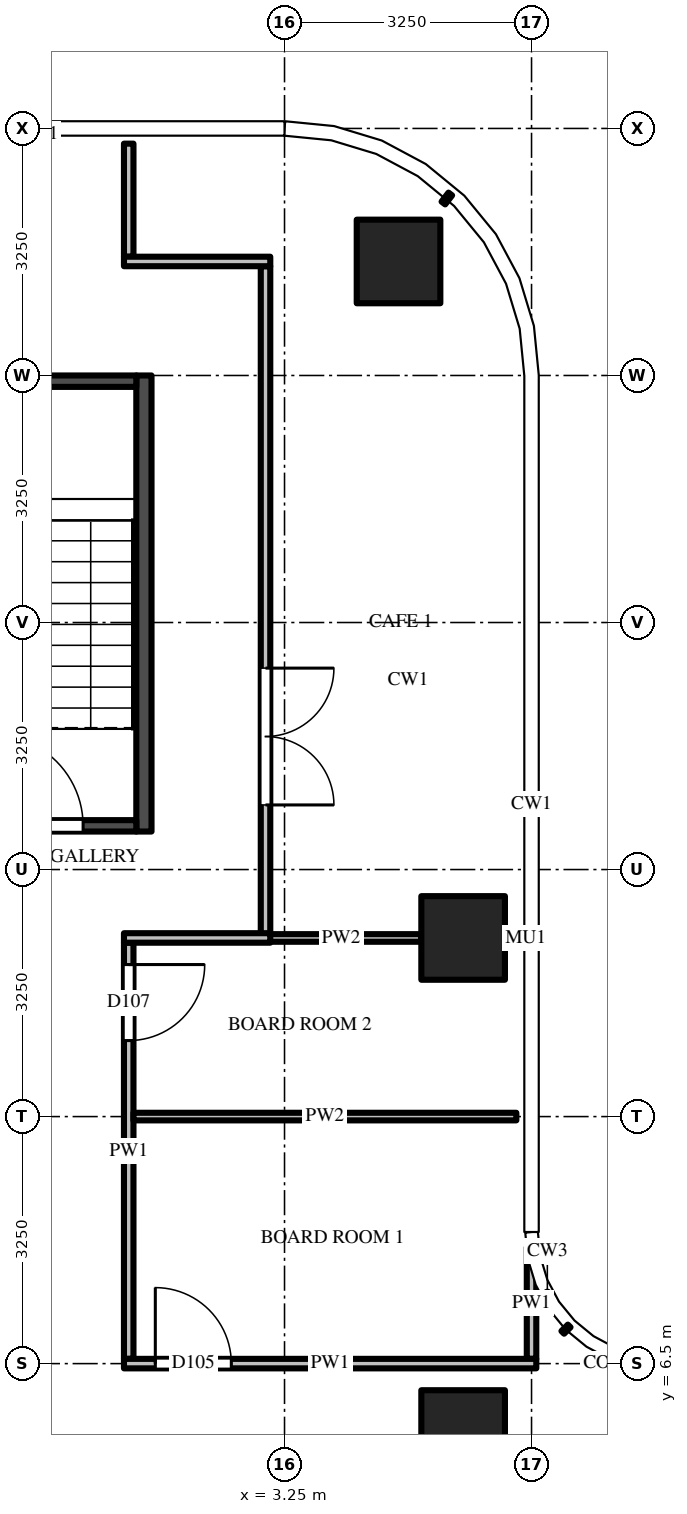
"""IFC4 building model, lengths in metres.
Left out: names, types, materials, properties, quantities, classifications, styles, units other than length and angle.
Written with IfcOpenShell. Run it as: python <this file> out.ifc"""

import sys

from ifc_helpers import new_model, si_unit, direction, frame, frame_2d, origin, origin_2d, place, context, subcontext, project, spatial, rectangle, extrude, source, transform, mapped, element, fill, save


model = new_model("IFC4")
c1 = context("Model", 3, precision=1e-05, world=origin(), true_north=direction((0.0, 1.0)))
c2 = subcontext(c1, "Body", "Model", "MODEL_VIEW")
j1 = project(units=[si_unit("LENGTHUNIT", "METRE"), si_unit("PLANEANGLEUNIT", "RADIAN")], contexts=[c1])
p1 = place(None, origin())
s1 = spatial("IfcSite", under=j1, at=p1, CompositionType="ELEMENT")
p2 = place(p1, origin())
s2 = spatial("IfcBuilding", under=s1, at=p2, CompositionType="ELEMENT")
p3 = place(p2, frame((0.0, 0.0, 248.0)))
s3 = spatial("IfcBuildingStorey", under=s2, at=p3, CompositionType="ELEMENT", Elevation=248.0)
m1 = source(origin(), c2, "Body", "SweptSolid", [
    extrude(rectangle(XDim=1.1, YDim=1.1, at=origin_2d()), origin(), (0.0, 0.0, 1.0), 3.9),
])
for number, where, z_axis, x_axis in (
    (1, (5.6, 12.1, 0.0), (0.0, 0.0, 1.0), (1.0, 0.0, 0.0)),
    (2, (4.75, 21.0, 0.0), (0.0, 0.0, 1.0), (1.0, 0.0, 0.0)),
    (3, (5.6, 5.6, 0.0), (0.0, 0.0, 1.0), (1.0, 0.0, 0.0)),
):
    element("IfcColumn", number, at=place(p3, frame(where, z_axis=z_axis, x_axis=x_axis)), inside=s3, PredefinedType="COLUMN", context=c2, shape_type="MappedRepresentation", body=[
        mapped(m1, transform((0.0, 0.0, 0.0))),
    ])
m2 = source(origin(), c2, "Body", "SweptSolid", [
    extrude(rectangle(XDim=6.0, YDim=0.2, at=frame_2d((3.0, 0.0))), origin(), (0.0, 0.0, 1.0), 3.7),
])
p4 = place(p3, frame((1.4, 13.5, 0.0), z_axis=(0.0, 0.0, 1.0), x_axis=(0.0, 1.0, 0.0)))
e4 = element("IfcWall", 4, at=p4, inside=s3, PredefinedType="SHEAR", context=c2, shape_type="MappedRepresentation", body=[
    mapped(m2, transform((0.0, 0.0, 0.0))),
])
m3 = source(origin(), c2, "Body", "SweptSolid", [
    extrude(rectangle(XDim=2.6, YDim=0.15, at=frame_2d((1.3, 0.0))), origin(), (0.0, 0.0, 1.0), 3.7),
])
p5 = place(p3, frame((-1.3, 13.575, 0.0), z_axis=(0.0, 0.0, 1.0), x_axis=(1.0, 0.0, 0.0)))
e5 = element("IfcWall", 5, at=p5, inside=s3, PredefinedType="SHEAR", context=c2, shape_type="MappedRepresentation", body=[
    mapped(m3, transform((0.0, 0.0, 0.0))),
])
m4 = source(origin(), c2, "Body", "SweptSolid", [
    extrude(rectangle(XDim=1.2, YDim=2.1, at=frame_2d((0.6, 1.05))), frame((0.0, 0.085, 0.0), z_axis=(0.0, -1.0, 0.0), x_axis=(1.0, 0.0, 0.0)), (0.0, 0.0, 1.0), 0.17),
])
p6 = place(p5, frame((0.7, 0.0, 0.0)))
e6 = element("IfcOpeningElement", 6, at=p6, cuts=e5, PredefinedType="OPENING", context=c2, shape_type="MappedRepresentation", body=[
    mapped(m4, transform((0.0, 0.0, 0.0))),
])
p7 = place(p3, frame((-1.3, 19.425, 0.0), z_axis=(0.0, 0.0, 1.0), x_axis=(1.0, 0.0, 0.0)))
e7 = element("IfcWall", 7, at=p7, inside=s3, PredefinedType="SHEAR", context=c2, shape_type="MappedRepresentation", body=[
    mapped(m3, transform((0.0, 0.0, 0.0))),
])
m5 = source(origin(), c2, "Body", "SweptSolid", [
    extrude(rectangle(XDim=5.475, YDim=0.125, at=frame_2d((2.738, 0.0))), origin(), (0.0, 0.0, 1.0), 2.997),
])
p8 = place(p3, frame((1.2, 12.038, 0.0), z_axis=(0.0, 0.0, 1.0), x_axis=(0.0, -1.0, 0.0)))
e8 = element("IfcWall", 8, at=p8, inside=s3, PredefinedType="PARTITIONING", context=c2, shape_type="MappedRepresentation", body=[
    mapped(m5, transform((0.0, 0.0, 0.0))),
])
m6 = source(origin(), c2, "Body", "SweptSolid", [
    extrude(rectangle(XDim=1.0, YDim=2.1, at=frame_2d((0.5, 1.05))), frame((0.0, 0.073, 0.0), z_axis=(0.0, -1.0, 0.0), x_axis=(1.0, 0.0, 0.0)), (0.0, 0.0, 1.0), 0.145),
])
p9 = place(p8, frame((0.288, 0.0, 0.0)))
e9 = element("IfcOpeningElement", 9, at=p9, cuts=e8, PredefinedType="OPENING", context=c2, shape_type="MappedRepresentation", body=[
    mapped(m6, transform((0.0, 0.0, 0.0))),
])
m7 = source(origin(), c2, "Body", "SweptSolid", [
    extrude(rectangle(XDim=1.488, YDim=0.125, at=frame_2d((0.744, 0.0))), origin(), (0.0, 0.0, 1.0), 2.78),
])
p10 = place(p3, frame((1.2, 22.55, 0.0), z_axis=(0.0, 0.0, 1.0), x_axis=(0.0, -1.0, 0.0)))
e10 = element("IfcWall", 10, at=p10, inside=s3, PredefinedType="PARTITIONING", context=c2, shape_type="MappedRepresentation", body=[
    mapped(m7, transform((0.0, 0.0, 0.0))),
])
m8 = source(origin(), c2, "Body", "SweptSolid", [
    extrude(rectangle(XDim=8.788, YDim=0.125, at=frame_2d((4.394, 0.0))), origin(), (0.0, 0.0, 1.0), 2.78),
])
p11 = place(p3, frame((3.0, 20.938, 0.0), z_axis=(0.0, 0.0, 1.0), x_axis=(0.0, -1.0, 0.0)))
e11 = element("IfcWall", 11, at=p11, inside=s3, PredefinedType="PARTITIONING", context=c2, shape_type="MappedRepresentation", body=[
    mapped(m8, transform((0.0, 0.0, 0.0))),
])
m9 = source(origin(), c2, "Body", "SweptSolid", [
    extrude(rectangle(XDim=1.8, YDim=2.1, at=frame_2d((0.9, 1.05))), frame((0.0, 0.073, 0.0), z_axis=(0.0, -1.0, 0.0), x_axis=(1.0, 0.0, 0.0)), (0.0, 0.0, 1.0), 0.145),
])
p12 = place(p11, frame((5.288, 0.0, 0.0)))
e12 = element("IfcOpeningElement", 12, at=p12, cuts=e11, PredefinedType="OPENING", context=c2, shape_type="MappedRepresentation", body=[
    mapped(m9, transform((0.0, 0.0, 0.0))),
])
m10 = source(origin(), c2, "Body", "SweptSolid", [
    extrude(rectangle(XDim=1.469, YDim=0.125, at=frame_2d((0.734, 0.0))), origin(), (0.0, 0.0, 1.0), 3.7),
])
p13 = place(p3, frame((6.5, 6.562, 0.0), z_axis=(0.0, 0.0, 1.0), x_axis=(0.0, 1.0, 0.0)))
e13 = element("IfcWall", 13, at=p13, inside=s3, PredefinedType="PARTITIONING", context=c2, shape_type="MappedRepresentation", body=[
    mapped(m10, transform((0.0, 0.0, 0.0))),
])
m11 = source(origin(), c2, "Body", "SweptSolid", [
    extrude(rectangle(XDim=5.425, YDim=0.125, at=frame_2d((2.712, 0.0))), origin(), (0.0, 0.0, 1.0), 2.78),
])
p14 = place(p3, frame((1.137, 6.5, 0.0), z_axis=(0.0, 0.0, 1.0), x_axis=(1.0, 0.0, 0.0)))
e14 = element("IfcWall", 14, at=p14, inside=s3, PredefinedType="PARTITIONING", context=c2, shape_type="MappedRepresentation", body=[
    mapped(m11, transform((0.0, 0.0, 0.0))),
])
p15 = place(p14, frame((0.413, 0.0, 0.0)))
e15 = element("IfcOpeningElement", 15, at=p15, cuts=e14, PredefinedType="OPENING", context=c2, shape_type="MappedRepresentation", body=[
    mapped(m6, transform((0.0, 0.0, 0.0))),
])
m12 = source(origin(), c2, "Body", "SweptSolid", [
    extrude(rectangle(XDim=5.038, YDim=0.1, at=frame_2d((2.519, 0.0))), origin(), (0.0, 0.0, 1.0), 2.78),
])
p16 = place(p3, frame((1.262, 9.75, 0.0), z_axis=(0.0, 0.0, 1.0), x_axis=(1.0, 0.0, 0.0)))
e16 = element("IfcWall", 16, at=p16, inside=s3, PredefinedType="PARTITIONING", context=c2, shape_type="MappedRepresentation", body=[
    mapped(m12, transform((0.0, 0.0, 0.0))),
])
m13 = source(origin(), c2, "Body", "SweptSolid", [
    extrude(rectangle(XDim=2.113, YDim=0.1, at=frame_2d((1.056, 0.0))), origin(), (0.0, 0.0, 1.0), 2.997),
])
p17 = place(p3, frame((2.938, 12.1, 0.0), z_axis=(0.0, 0.0, 1.0), x_axis=(1.0, 0.0, 0.0)))
e17 = element("IfcWall", 17, at=p17, inside=s3, PredefinedType="PARTITIONING", context=c2, shape_type="MappedRepresentation", body=[
    mapped(m13, transform((0.0, 0.0, 0.0))),
])
m14 = source(origin(), c2, "Body", "SweptSolid", [
    extrude(rectangle(XDim=1.925, YDim=0.125, at=frame_2d((0.962, 0.0))), origin(), (0.0, 0.0, 1.0), 2.997),
])
p18 = place(p3, frame((3.062, 12.1, 0.0), z_axis=(0.0, 0.0, 1.0), x_axis=(-1.0, 0.0, 0.0)))
e18 = element("IfcWall", 18, at=p18, inside=s3, PredefinedType="PARTITIONING", context=c2, shape_type="MappedRepresentation", body=[
    mapped(m14, transform((0.0, 0.0, 0.0))),
])
m15 = source(origin(), c2, "Body", "SweptSolid", [
    extrude(rectangle(XDim=1.925, YDim=0.125, at=frame_2d((0.962, 0.0))), origin(), (0.0, 0.0, 1.0), 2.78),
])
p19 = place(p3, frame((1.137, 21.0, 0.0), z_axis=(0.0, 0.0, 1.0), x_axis=(1.0, 0.0, 0.0)))
e19 = element("IfcWall", 19, at=p19, inside=s3, PredefinedType="PARTITIONING", context=c2, shape_type="MappedRepresentation", body=[
    mapped(m15, transform((0.0, 0.0, 0.0))),
])
m16 = source(origin(), c2, "Body", "SweptSolid", [
    extrude(rectangle(XDim=1.2, YDim=2.1, at=frame_2d((0.6, 1.05))), frame((0.0, 0.025, 0.0), z_axis=(0.0, -1.0, 0.0), x_axis=(1.0, 0.0, 0.0)), (0.0, 0.0, 1.0), 0.05),
])
p20 = place(p6, origin())
e20 = element("IfcDoor", 20, at=p20, inside=s3, OperationType="SINGLE_SWING_LEFT", PredefinedType="DOOR", context=c2, shape_type="MappedRepresentation", body=[
    mapped(m16, transform((0.0, 0.0, 0.0))),
])
fill(e6, e20)
m17 = source(origin(), c2, "Body", "SweptSolid", [
    extrude(rectangle(XDim=1.0, YDim=2.1, at=frame_2d((0.5, 1.05))), frame((0.0, 0.025, 0.0), z_axis=(0.0, -1.0, 0.0), x_axis=(1.0, 0.0, 0.0)), (0.0, 0.0, 1.0), 0.05),
])
p21 = place(p15, origin())
e21 = element("IfcDoor", 21, at=p21, inside=s3, OperationType="SINGLE_SWING_LEFT", PredefinedType="DOOR", context=c2, shape_type="MappedRepresentation", body=[
    mapped(m17, transform((0.0, 0.0, 0.0))),
])
fill(e15, e21)
p22 = place(p9, origin())
e22 = element("IfcDoor", 22, at=p22, inside=s3, OperationType="SINGLE_SWING_LEFT", PredefinedType="DOOR", context=c2, shape_type="MappedRepresentation", body=[
    mapped(m17, transform((0.0, 0.0, 0.0))),
])
fill(e9, e22)
m18 = source(origin(), c2, "Body", "SweptSolid", [
    extrude(rectangle(XDim=1.8, YDim=2.1, at=frame_2d((0.9, 1.05))), frame((0.0, 0.025, 0.0), z_axis=(0.0, -1.0, 0.0), x_axis=(1.0, 0.0, 0.0)), (0.0, 0.0, 1.0), 0.05),
])
p23 = place(p12, origin())
e23 = element("IfcDoor", 23, at=p23, inside=s3, OperationType="DOUBLE_DOOR_SINGLE_SWING", PredefinedType="DOOR", context=c2, shape_type="MappedRepresentation", body=[
    mapped(m18, transform((0.0, 0.0, 0.0))),
])
fill(e12, e23)
save(model, sys.argv[1])
